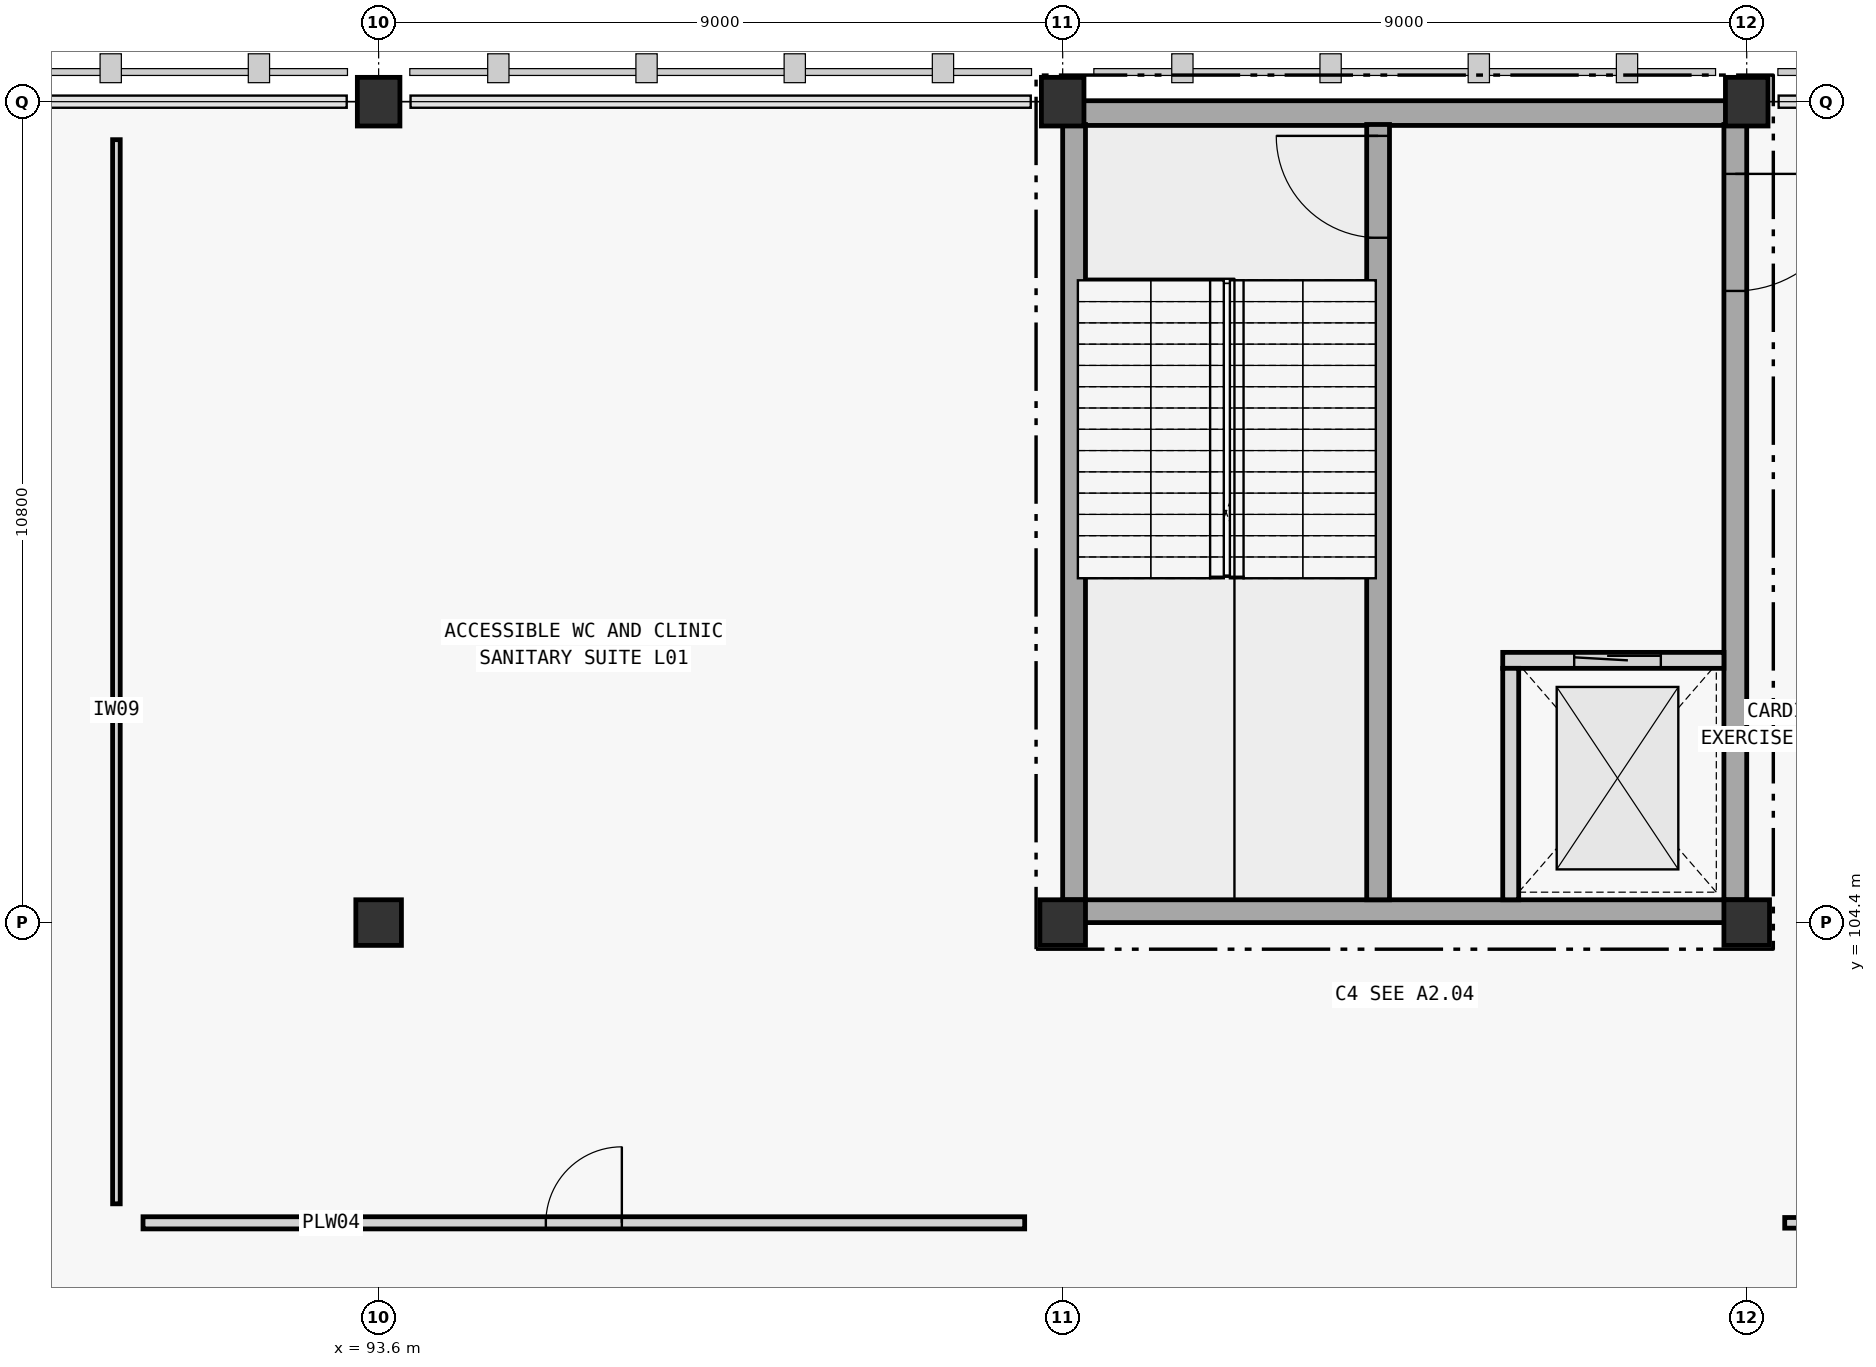
"""IFC4 building model, lengths in metres.
Left out: names, types, materials, properties, quantities, classifications, styles, units other than length and angle.
Written with IfcOpenShell. Run it as: python <this file> out.ifc"""

import sys

from ifc_helpers import new_model, si_unit, direction, frame, frame_2d, origin, origin_2d, place, context, subcontext, project, spatial, rectangle, extrude, element, fill, save


model = new_model("IFC4")
c1 = context("Model", 3, precision=1e-05, world=origin(), true_north=direction((0.0, 1.0)))
c2 = subcontext(c1, "Body", "Model", "MODEL_VIEW")
j1 = project(units=[si_unit("LENGTHUNIT", "METRE"), si_unit("PLANEANGLEUNIT", "RADIAN")], contexts=[c1])
p1 = place(None, origin())
s1 = spatial("IfcSite", under=j1, at=p1, CompositionType="ELEMENT")
p2 = place(p1, origin())
s2 = spatial("IfcBuilding", under=s1, at=p2, CompositionType="ELEMENT")
p3 = place(p2, frame((0.0, 0.0, 5.4)))
s3 = spatial("IfcBuildingStorey", under=s2, at=p3, CompositionType="ELEMENT", Elevation=5.4)
p4 = place(p3, frame((93.6, 104.4, 0.0), z_axis=(0.0, 0.0, 1.0), x_axis=(1.0, 0.0, 0.0)))
e1 = element("IfcColumn", 1, at=p4, inside=s3, PredefinedType="COLUMN", context=c2, shape_type="SweptSolid", body=[
    extrude(rectangle(XDim=0.6, YDim=0.6, at=origin_2d()), origin(), (0.0, 0.0, 1.0), 5.4),
])
p5 = place(p3, frame((93.6, 115.2, 0.0), z_axis=(0.0, 0.0, 1.0), x_axis=(1.0, 0.0, 0.0)))
e2 = element("IfcColumn", 2, at=p5, inside=s3, PredefinedType="COLUMN", context=c2, shape_type="SweptSolid", body=[
    extrude(rectangle(XDim=0.56, YDim=0.64, at=origin_2d()), origin(), (0.0, 0.0, 1.0), 5.4),
])
p6 = place(p3, frame((102.6, 104.4, 0.0), z_axis=(0.0, 0.0, 1.0), x_axis=(1.0, 0.0, 0.0)))
e3 = element("IfcColumn", 3, at=p6, inside=s3, PredefinedType="COLUMN", context=c2, shape_type="SweptSolid", body=[
    extrude(rectangle(XDim=0.6, YDim=0.6, at=origin_2d()), origin(), (0.0, 0.0, 1.0), 5.4),
])
p7 = place(p3, frame((102.6, 115.2, 0.0), z_axis=(0.0, 0.0, 1.0), x_axis=(1.0, 0.0, 0.0)))
e4 = element("IfcColumn", 4, at=p7, inside=s3, PredefinedType="COLUMN", context=c2, shape_type="SweptSolid", body=[
    extrude(rectangle(XDim=0.56, YDim=0.64, at=origin_2d()), origin(), (0.0, 0.0, 1.0), 5.4),
])
p8 = place(p3, frame((111.6, 104.4, 0.0), z_axis=(0.0, 0.0, 1.0), x_axis=(1.0, 0.0, 0.0)))
e5 = element("IfcColumn", 5, at=p8, inside=s3, PredefinedType="COLUMN", context=c2, shape_type="SweptSolid", body=[
    extrude(rectangle(XDim=0.6, YDim=0.6, at=origin_2d()), origin(), (0.0, 0.0, 1.0), 5.4),
])
p9 = place(p3, frame((111.6, 115.2, 0.0), z_axis=(0.0, 0.0, 1.0), x_axis=(1.0, 0.0, 0.0)))
e6 = element("IfcColumn", 6, at=p9, inside=s3, PredefinedType="COLUMN", context=c2, shape_type="SweptSolid", body=[
    extrude(rectangle(XDim=0.56, YDim=0.64, at=origin_2d()), origin(), (0.0, 0.0, 1.0), 5.4),
])
p10 = place(p3, frame((111.6, 104.55, 0.0), z_axis=(0.0, 0.0, 1.0), x_axis=(-1.0, 0.0, 0.0)))
e7 = element("IfcWall", 7, at=p10, inside=s3, PredefinedType="SHEAR", context=c2, shape_type="SweptSolid", body=[
    extrude(rectangle(XDim=9.0, YDim=0.3, at=frame_2d((4.5, 0.0))), origin(), (0.0, 0.0, 1.0), 5.4),
])
p11 = place(p3, frame((102.6, 115.05, 0.0), z_axis=(0.0, 0.0, 1.0), x_axis=(1.0, 0.0, 0.0)))
e8 = element("IfcWall", 8, at=p11, inside=s3, PredefinedType="SHEAR", context=c2, shape_type="SweptSolid", body=[
    extrude(rectangle(XDim=9.0, YDim=0.325, at=frame_2d((4.5, 0.0))), origin(), (0.0, 0.0, 1.0), 5.4),
])
p12 = place(p3, frame((102.75, 104.7, 0.0), z_axis=(0.0, 0.0, 1.0), x_axis=(0.0, 1.0, 0.0)))
e9 = element("IfcWall", 9, at=p12, inside=s3, PredefinedType="SHEAR", context=c2, shape_type="SweptSolid", body=[
    extrude(rectangle(XDim=10.2, YDim=0.3, at=frame_2d((5.1, 0.0))), origin(), (0.0, 0.0, 1.0), 5.4),
])
p13 = place(p3, frame((111.45, 114.9, 0.0), z_axis=(0.0, 0.0, 1.0), x_axis=(0.0, -1.0, 0.0)))
e10 = element("IfcWall", 10, at=p13, inside=s3, PredefinedType="SHEAR", context=c2, shape_type="SweptSolid", body=[
    extrude(rectangle(XDim=10.2, YDim=0.3, at=frame_2d((5.1, 0.0))), origin(), (0.0, 0.0, 1.0), 5.4),
])
p14 = place(p13, frame((0.65, 0.0, 0.0)))
e11 = element("IfcOpeningElement", 11, at=p14, cuts=e10, PredefinedType="OPENING", context=c2, shape_type="SweptSolid", body=[
    extrude(rectangle(XDim=1.54, YDim=2.22, at=frame_2d((0.77, 1.11))), frame((0.0, 0.15, 0.0), z_axis=(0.0, -1.0, 0.0), x_axis=(1.0, 0.0, 0.0)), (0.0, 0.0, 1.0), 0.3),
])
p15 = place(p3, frame((106.75, 104.7, 0.0), z_axis=(0.0, 0.0, 1.0), x_axis=(0.0, 1.0, 0.0)))
e12 = element("IfcWall", 12, at=p15, inside=s3, PredefinedType="SHEAR", context=c2, shape_type="SweptSolid", body=[
    extrude(rectangle(XDim=10.2, YDim=0.3, at=frame_2d((5.1, 0.0))), origin(), (0.0, 0.0, 1.0), 5.4),
])
p16 = place(p15, frame((8.71, 0.0, 0.0)))
e13 = element("IfcOpeningElement", 13, at=p16, cuts=e12, PredefinedType="OPENING", context=c2, shape_type="SweptSolid", body=[
    extrude(rectangle(XDim=1.34, YDim=2.18, at=frame_2d((0.67, 1.09))), frame((0.0, 0.15, 0.0), z_axis=(0.0, -1.0, 0.0), x_axis=(1.0, 0.0, 0.0)), (0.0, 0.0, 1.0), 0.3),
])
p17 = place(p3, frame((108.39, 107.85, 0.0), z_axis=(0.0, 0.0, 1.0), x_axis=(1.0, 0.0, 0.0)))
e14 = element("IfcWall", 14, at=p17, inside=s3, PredefinedType="STANDARD", context=c2, shape_type="SweptSolid", body=[
    extrude(rectangle(XDim=2.91, YDim=0.21, at=frame_2d((1.455, 0.0))), origin(), (0.0, 0.0, 1.0), 5.4),
])
p18 = place(p17, frame((0.94, 0.0, 0.0)))
e15 = element("IfcOpeningElement", 15, at=p18, cuts=e14, PredefinedType="OPENING", context=c2, shape_type="SweptSolid", body=[
    extrude(rectangle(XDim=1.14, YDim=2.16, at=frame_2d((0.57, 1.08))), frame((0.0, 0.105, 0.0), z_axis=(0.0, -1.0, 0.0), x_axis=(1.0, 0.0, 0.0)), (0.0, 0.0, 1.0), 0.21),
])
p19 = place(p3, frame((108.495, 104.7, 0.0), z_axis=(0.0, 0.0, 1.0), x_axis=(0.0, 1.0, 0.0)))
e16 = element("IfcWall", 16, at=p19, inside=s3, PredefinedType="STANDARD", context=c2, shape_type="SweptSolid", body=[
    extrude(rectangle(XDim=3.045, YDim=0.21, at=frame_2d((1.522, 0.0))), origin(), (0.0, 0.0, 1.0), 5.4),
])
p20 = place(p3, frame((90.5, 100.45, 0.0), z_axis=(0.0, 0.0, 1.0), x_axis=(1.0, 0.0, 0.0)))
e17 = element("IfcWall", 17, at=p20, inside=s3, PredefinedType="PLUMBINGWALL", context=c2, shape_type="SweptSolid", body=[
    extrude(rectangle(XDim=11.6, YDim=0.16, at=frame_2d((5.8, 0.0))), origin(), (0.0, 0.0, 1.0), 4.22),
])
p21 = place(p20, frame((5.3, 0.0, 0.0)))
e18 = element("IfcOpeningElement", 18, at=p21, cuts=e17, PredefinedType="OPENING", context=c2, shape_type="SweptSolid", body=[
    extrude(rectangle(XDim=1.0, YDim=2.15, at=frame_2d((0.5, 1.075))), frame((0.0, 0.08, 0.0), z_axis=(0.0, -1.0, 0.0), x_axis=(1.0, 0.0, 0.0)), (0.0, 0.0, 1.0), 0.16),
])
p22 = place(p3, frame((112.1, 100.45, 0.0), z_axis=(0.0, 0.0, 1.0), x_axis=(1.0, 0.0, 0.0)))
e19 = element("IfcWall", 19, at=p22, inside=s3, PredefinedType="STANDARD", context=c2, shape_type="SweptSolid", body=[
    extrude(rectangle(XDim=6.2, YDim=0.14, at=frame_2d((3.1, 0.0))), origin(), (0.0, 0.0, 1.0), 4.22),
])
p23 = place(p22, frame((2.52, 0.0, 0.0)))
e20 = element("IfcOpeningElement", 20, at=p23, cuts=e19, PredefinedType="OPENING", context=c2, shape_type="SweptSolid", body=[
    extrude(rectangle(XDim=1.16, YDim=2.18, at=frame_2d((0.58, 1.09))), frame((0.0, 0.07, 0.0), z_axis=(0.0, -1.0, 0.0), x_axis=(1.0, 0.0, 0.0)), (0.0, 0.0, 1.0), 0.14),
])
p24 = place(p3, frame((90.15, 100.7, 0.0), z_axis=(0.0, 0.0, 1.0), x_axis=(0.0, 1.0, 0.0)))
e21 = element("IfcWall", 21, at=p24, inside=s3, PredefinedType="STANDARD", context=c2, shape_type="SweptSolid", body=[
    extrude(rectangle(XDim=14.0, YDim=0.1, at=frame_2d((7.0, 0.0))), origin(), (0.0, 0.0, 1.0), 4.22),
])
p25 = place(p18, origin())
e22 = element("IfcDoor", 22, at=p25, inside=s3, OperationType="SLIDING_TO_LEFT", PredefinedType="DOOR", context=c2, shape_type="SweptSolid", body=[
    extrude(rectangle(XDim=1.14, YDim=2.16, at=frame_2d((0.57, 1.08))), frame((0.0, 0.025, 0.0), z_axis=(0.0, -1.0, 0.0), x_axis=(1.0, 0.0, 0.0)), (0.0, 0.0, 1.0), 0.05),
])
fill(e15, e22)
p26 = place(p16, origin())
e23 = element("IfcDoor", 23, at=p26, inside=s3, OperationType="SINGLE_SWING_RIGHT", PredefinedType="DOOR", context=c2, shape_type="SweptSolid", body=[
    extrude(rectangle(XDim=1.34, YDim=2.18, at=frame_2d((0.67, 1.09))), frame((0.0, 0.025, 0.0), z_axis=(0.0, -1.0, 0.0), x_axis=(1.0, 0.0, 0.0)), (0.0, 0.0, 1.0), 0.05),
])
fill(e13, e23)
p27 = place(p14, origin())
e24 = element("IfcDoor", 24, at=p27, inside=s3, OperationType="SINGLE_SWING_LEFT", PredefinedType="DOOR", context=c2, shape_type="SweptSolid", body=[
    extrude(rectangle(XDim=1.54, YDim=2.22, at=frame_2d((0.77, 1.11))), frame((0.0, 0.025, 0.0), z_axis=(0.0, -1.0, 0.0), x_axis=(1.0, 0.0, 0.0)), (0.0, 0.0, 1.0), 0.05),
])
fill(e11, e24)
p28 = place(p21, origin())
e25 = element("IfcDoor", 25, at=p28, inside=s3, OperationType="SINGLE_SWING_RIGHT", PredefinedType="DOOR", context=c2, shape_type="SweptSolid", body=[
    extrude(rectangle(XDim=1.0, YDim=2.15, at=frame_2d((0.5, 1.075))), frame((0.0, 0.025, 0.0), z_axis=(0.0, -1.0, 0.0), x_axis=(1.0, 0.0, 0.0)), (0.0, 0.0, 1.0), 0.05),
])
fill(e18, e25)
save(model, sys.argv[1])
